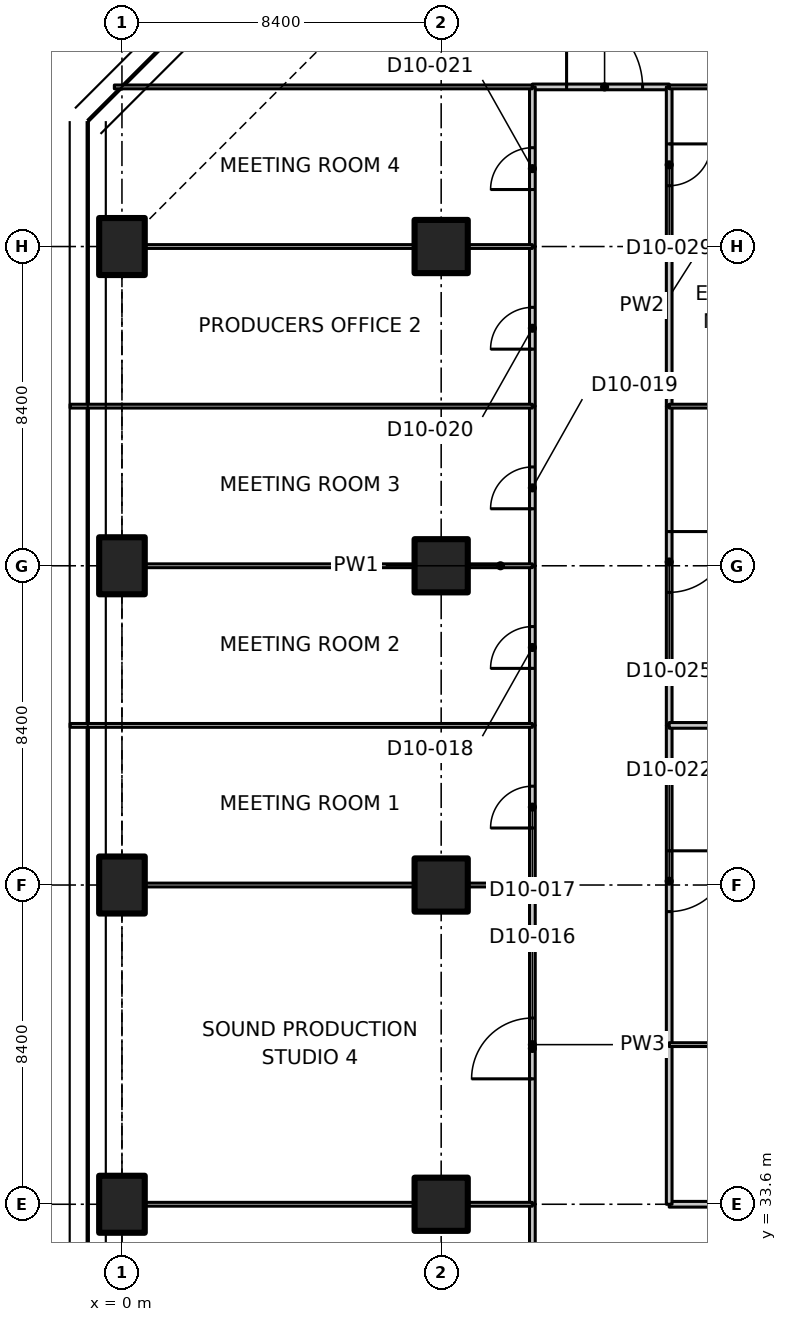
"""IFC4 building model, lengths in metres.
Left out: names, types, materials, properties, quantities, classifications, styles, units other than length and angle.
Written with IfcOpenShell. Run it as: python <this file> out.ifc"""

import sys

from ifc_helpers import new_model, si_unit, direction, frame, frame_2d, origin, origin_2d, place, context, subcontext, project, spatial, polyline, rectangle, outline, extrude, element, fill, save


model = new_model("IFC4")
c1 = context("Model", 3, precision=1e-05, world=origin(), true_north=direction((0.0, 1.0)))
c2 = subcontext(c1, "Body", "Model", "MODEL_VIEW")
j1 = project(units=[si_unit("LENGTHUNIT", "METRE"), si_unit("PLANEANGLEUNIT", "RADIAN")], contexts=[c1])
p1 = place(None, origin())
s1 = spatial("IfcSite", under=j1, at=p1, CompositionType="ELEMENT")
p2 = place(p1, origin())
s2 = spatial("IfcBuilding", under=s1, at=p2, CompositionType="ELEMENT")
p3 = place(p2, frame((0.0, 0.0, 68.9)))
s3 = spatial("IfcBuildingStorey", under=s2, at=p3, CompositionType="ELEMENT", Elevation=68.9)
for number, where, z_axis, x_axis in (
    (1, (0.0, 33.6, 0.0), (0.0, 0.0, 1.0), (1.0, 0.0, 0.0)),
    (2, (0.0, 42.0, 0.0), (0.0, 0.0, 1.0), (1.0, 0.0, 0.0)),
    (3, (0.0, 50.4, 0.0), (0.0, 0.0, 1.0), (1.0, 0.0, 0.0)),
    (4, (0.0, 58.8, 0.0), (0.0, 0.0, 1.0), (1.0, 0.0, 0.0)),
):
    element("IfcColumn", number, at=place(p3, frame(where, z_axis=z_axis, x_axis=x_axis)), inside=s3, PredefinedType="COLUMN", context=c2, shape_type="SweptSolid", body=[
        extrude(rectangle(XDim=1.2, YDim=1.5, at=origin_2d()), origin(), (0.0, 0.0, 1.0), 3.35),
    ])
for number, where, z_axis, x_axis in (
    (5, (8.4, 33.6, 0.0), (0.0, 0.0, 1.0), (1.0, 0.0, 0.0)),
    (6, (8.4, 42.0, 0.0), (0.0, 0.0, 1.0), (1.0, 0.0, 0.0)),
    (7, (8.4, 50.4, 0.0), (0.0, 0.0, 1.0), (1.0, 0.0, 0.0)),
    (8, (8.4, 58.8, 0.0), (0.0, 0.0, 1.0), (1.0, 0.0, 0.0)),
):
    element("IfcColumn", number, at=place(p3, frame(where, z_axis=z_axis, x_axis=x_axis)), inside=s3, PredefinedType="COLUMN", context=c2, shape_type="SweptSolid", body=[
        extrude(rectangle(XDim=1.4, YDim=1.4, at=origin_2d()), origin(), (0.0, 0.0, 1.0), 3.35),
    ])
p4 = place(p3, frame((10.8, 25.2, 0.0), z_axis=(0.0, 0.0, 1.0), x_axis=(0.0, 1.0, 0.0)))
e9 = element("IfcWall", 9, at=p4, inside=s3, PredefinedType="PARTITIONING", context=c2, shape_type="SweptSolid", body=[
    extrude(rectangle(XDim=8.4, YDim=0.15, at=frame_2d((4.2, 0.0))), origin(), (0.0, 0.0, 1.0), 3.33),
])
p5 = place(p4, frame((3.3, 0.0, 0.0)))
e10 = element("IfcOpeningElement", 10, at=p5, cuts=e9, PredefinedType="OPENING", context=c2, shape_type="SweptSolid", body=[
    extrude(rectangle(XDim=1.6, YDim=2.1, at=frame_2d((0.8, 1.05))), frame((0.0, 0.085, 0.0), z_axis=(0.0, -1.0, 0.0), x_axis=(1.0, 0.0, 0.0)), (0.0, 0.0, 1.0), 0.17),
])
p6 = place(p3, frame((14.4, 33.6, 0.0), z_axis=(0.0, 0.0, 1.0), x_axis=(1.0, 0.0, 0.0)))
e11 = element("IfcWall", 11, at=p6, inside=s3, PredefinedType="PARTITIONING", context=c2, shape_type="SweptSolid", body=[
    extrude(rectangle(XDim=1.5, YDim=0.15, at=frame_2d((0.75, 0.0))), origin(), (0.0, 0.0, 1.0), 3.33),
])
p7 = place(p3, frame((10.8, 63.0, 0.0), z_axis=(0.0, 0.0, 1.0), x_axis=(1.0, 0.0, 0.0)))
e12 = element("IfcWall", 12, at=p7, inside=s3, PredefinedType="PARTITIONING", context=c2, shape_type="SweptSolid", body=[
    extrude(rectangle(XDim=3.6, YDim=0.15, at=frame_2d((1.8, 0.0))), origin(), (0.0, 0.0, 1.0), 3.33),
])
p8 = place(p7, frame((0.9, 0.0, 0.0)))
e13 = element("IfcOpeningElement", 13, at=p8, cuts=e12, PredefinedType="OPENING", context=c2, shape_type="SweptSolid", body=[
    extrude(rectangle(XDim=2.0, YDim=2.4, at=frame_2d((1.0, 1.2))), frame((0.0, 0.085, 0.0), z_axis=(0.0, -1.0, 0.0), x_axis=(1.0, 0.0, 0.0)), (0.0, 0.0, 1.0), 0.17),
])
p9 = place(p3, frame((10.8, 33.6, 0.0), z_axis=(0.0, 0.0, 1.0), x_axis=(0.0, 1.0, 0.0)))
e14 = element("IfcWall", 14, at=p9, inside=s3, PredefinedType="PARTITIONING", context=c2, shape_type="SweptSolid", body=[
    extrude(rectangle(XDim=8.4, YDim=0.15, at=frame_2d((4.2, 0.0))), origin(), (0.0, 0.0, 1.0), 3.33),
])
p10 = place(p9, frame((3.3, 0.0, 0.0)))
e15 = element("IfcOpeningElement", 15, at=p10, cuts=e14, PredefinedType="OPENING", context=c2, shape_type="SweptSolid", body=[
    extrude(rectangle(XDim=1.6, YDim=2.1, at=frame_2d((0.8, 1.05))), frame((0.0, 0.085, 0.0), z_axis=(0.0, -1.0, 0.0), x_axis=(1.0, 0.0, 0.0)), (0.0, 0.0, 1.0), 0.17),
])
p11 = place(p3, frame((10.8, 42.0, 0.0), z_axis=(0.0, 0.0, 1.0), x_axis=(0.0, 1.0, 0.0)))
e16 = element("IfcWall", 16, at=p11, inside=s3, PredefinedType="PARTITIONING", context=c2, shape_type="SweptSolid", body=[
    extrude(rectangle(XDim=4.2, YDim=0.15, at=frame_2d((2.1, 0.0))), origin(), (0.0, 0.0, 1.0), 3.33),
])
p12 = place(p11, frame((1.5, 0.0, 0.0)))
e17 = element("IfcOpeningElement", 17, at=p12, cuts=e16, PredefinedType="OPENING", context=c2, shape_type="SweptSolid", body=[
    extrude(rectangle(XDim=1.1, YDim=2.1, at=frame_2d((0.55, 1.05))), frame((0.0, 0.085, 0.0), z_axis=(0.0, -1.0, 0.0), x_axis=(1.0, 0.0, 0.0)), (0.0, 0.0, 1.0), 0.17),
])
p13 = place(p3, frame((10.8, 46.2, 0.0), z_axis=(0.0, 0.0, 1.0), x_axis=(0.0, 1.0, 0.0)))
e18 = element("IfcWall", 18, at=p13, inside=s3, PredefinedType="PARTITIONING", context=c2, shape_type="SweptSolid", body=[
    extrude(rectangle(XDim=4.2, YDim=0.15, at=frame_2d((2.1, 0.0))), origin(), (0.0, 0.0, 1.0), 3.33),
])
p14 = place(p13, frame((1.5, 0.0, 0.0)))
e19 = element("IfcOpeningElement", 19, at=p14, cuts=e18, PredefinedType="OPENING", context=c2, shape_type="SweptSolid", body=[
    extrude(rectangle(XDim=1.1, YDim=2.1, at=frame_2d((0.55, 1.05))), frame((0.0, 0.085, 0.0), z_axis=(0.0, -1.0, 0.0), x_axis=(1.0, 0.0, 0.0)), (0.0, 0.0, 1.0), 0.17),
])
p15 = place(p3, frame((10.8, 50.4, 0.0), z_axis=(0.0, 0.0, 1.0), x_axis=(0.0, 1.0, 0.0)))
e20 = element("IfcWall", 20, at=p15, inside=s3, PredefinedType="PARTITIONING", context=c2, shape_type="SweptSolid", body=[
    extrude(rectangle(XDim=4.2, YDim=0.15, at=frame_2d((2.1, 0.0))), origin(), (0.0, 0.0, 1.0), 3.33),
])
p16 = place(p15, frame((1.5, 0.0, 0.0)))
e21 = element("IfcOpeningElement", 21, at=p16, cuts=e20, PredefinedType="OPENING", context=c2, shape_type="SweptSolid", body=[
    extrude(rectangle(XDim=1.1, YDim=2.1, at=frame_2d((0.55, 1.05))), frame((0.0, 0.085, 0.0), z_axis=(0.0, -1.0, 0.0), x_axis=(1.0, 0.0, 0.0)), (0.0, 0.0, 1.0), 0.17),
])
p17 = place(p3, frame((10.8, 54.6, 0.0), z_axis=(0.0, 0.0, 1.0), x_axis=(0.0, 1.0, 0.0)))
e22 = element("IfcWall", 22, at=p17, inside=s3, PredefinedType="PARTITIONING", context=c2, shape_type="SweptSolid", body=[
    extrude(rectangle(XDim=4.2, YDim=0.15, at=frame_2d((2.1, 0.0))), origin(), (0.0, 0.0, 1.0), 3.33),
])
p18 = place(p17, frame((1.5, 0.0, 0.0)))
e23 = element("IfcOpeningElement", 23, at=p18, cuts=e22, PredefinedType="OPENING", context=c2, shape_type="SweptSolid", body=[
    extrude(rectangle(XDim=1.1, YDim=2.1, at=frame_2d((0.55, 1.05))), frame((0.0, 0.085, 0.0), z_axis=(0.0, -1.0, 0.0), x_axis=(1.0, 0.0, 0.0)), (0.0, 0.0, 1.0), 0.17),
])
p19 = place(p3, frame((10.8, 58.8, 0.0), z_axis=(0.0, 0.0, 1.0), x_axis=(0.0, 1.0, 0.0)))
e24 = element("IfcWall", 24, at=p19, inside=s3, PredefinedType="PARTITIONING", context=c2, shape_type="SweptSolid", body=[
    extrude(rectangle(XDim=4.2, YDim=0.15, at=frame_2d((2.1, 0.0))), origin(), (0.0, 0.0, 1.0), 3.33),
])
p20 = place(p19, frame((1.5, 0.0, 0.0)))
e25 = element("IfcOpeningElement", 25, at=p20, cuts=e24, PredefinedType="OPENING", context=c2, shape_type="SweptSolid", body=[
    extrude(rectangle(XDim=1.1, YDim=2.1, at=frame_2d((0.55, 1.05))), frame((0.0, 0.085, 0.0), z_axis=(0.0, -1.0, 0.0), x_axis=(1.0, 0.0, 0.0)), (0.0, 0.0, 1.0), 0.17),
])
p21 = place(p3, frame((14.4, 46.2, 0.0), z_axis=(0.0, 0.0, 1.0), x_axis=(0.0, -1.0, 0.0)))
e26 = element("IfcWall", 26, at=p21, inside=s3, PredefinedType="PARTITIONING", context=c2, shape_type="SweptSolid", body=[
    extrude(rectangle(XDim=8.4, YDim=0.15, at=frame_2d((4.2, 0.0))), origin(), (0.0, 0.0, 1.0), 3.33),
])
p22 = place(p21, frame((3.3, 0.0, 0.0)))
e27 = element("IfcOpeningElement", 27, at=p22, cuts=e26, PredefinedType="OPENING", context=c2, shape_type="SweptSolid", body=[
    extrude(rectangle(XDim=1.6, YDim=2.1, at=frame_2d((0.8, 1.05))), frame((0.0, 0.085, 0.0), z_axis=(0.0, -1.0, 0.0), x_axis=(1.0, 0.0, 0.0)), (0.0, 0.0, 1.0), 0.17),
])
p23 = place(p3, frame((14.4, 37.8, 0.0), z_axis=(0.0, 0.0, 1.0), x_axis=(0.0, -1.0, 0.0)))
e28 = element("IfcWall", 28, at=p23, inside=s3, PredefinedType="PARTITIONING", context=c2, shape_type="SweptSolid", body=[
    extrude(rectangle(XDim=4.2, YDim=0.15, at=frame_2d((2.1, 0.0))), origin(), (0.0, 0.0, 1.0), 3.33),
])
p24 = place(p3, frame((14.4, 54.6, 0.0), z_axis=(0.0, 0.0, 1.0), x_axis=(0.0, -1.0, 0.0)))
e29 = element("IfcWall", 29, at=p24, inside=s3, PredefinedType="PARTITIONING", context=c2, shape_type="SweptSolid", body=[
    extrude(rectangle(XDim=8.4, YDim=0.15, at=frame_2d((4.2, 0.0))), origin(), (0.0, 0.0, 1.0), 3.33),
])
p25 = place(p24, frame((3.3, 0.0, 0.0)))
e30 = element("IfcOpeningElement", 30, at=p25, cuts=e29, PredefinedType="OPENING", context=c2, shape_type="SweptSolid", body=[
    extrude(rectangle(XDim=1.6, YDim=2.1, at=frame_2d((0.8, 1.05))), frame((0.0, 0.085, 0.0), z_axis=(0.0, -1.0, 0.0), x_axis=(1.0, 0.0, 0.0)), (0.0, 0.0, 1.0), 0.17),
])
p26 = place(p3, frame((14.4, 58.8, 0.0), z_axis=(0.0, 0.0, 1.0), x_axis=(0.0, -1.0, 0.0)))
e31 = element("IfcWall", 31, at=p26, inside=s3, PredefinedType="PARTITIONING", context=c2, shape_type="SweptSolid", body=[
    extrude(rectangle(XDim=4.2, YDim=0.15, at=frame_2d((2.1, 0.0))), origin(), (0.0, 0.0, 1.0), 3.33),
])
p27 = place(p3, frame((14.4, 63.0, 0.0), z_axis=(0.0, 0.0, 1.0), x_axis=(0.0, -1.0, 0.0)))
e32 = element("IfcWall", 32, at=p27, inside=s3, PredefinedType="PARTITIONING", context=c2, shape_type="SweptSolid", body=[
    extrude(rectangle(XDim=4.2, YDim=0.15, at=frame_2d((2.1, 0.0))), origin(), (0.0, 0.0, 1.0), 3.33),
])
p28 = place(p27, frame((1.5, 0.0, 0.0)))
e33 = element("IfcOpeningElement", 33, at=p28, cuts=e32, PredefinedType="OPENING", context=c2, shape_type="SweptSolid", body=[
    extrude(rectangle(XDim=1.1, YDim=2.1, at=frame_2d((0.55, 1.05))), frame((0.0, 0.085, 0.0), z_axis=(0.0, -1.0, 0.0), x_axis=(1.0, 0.0, 0.0)), (0.0, 0.0, 1.0), 0.17),
])
p29 = place(p3, frame((10.8, 63.0, 0.0), z_axis=(0.0, 0.0, 1.0), x_axis=(-1.0, 0.0, 0.0)))
e34 = element("IfcWall", 34, at=p29, inside=s3, PredefinedType="PARTITIONING", context=c2, shape_type="SweptSolid", body=[
    extrude(outline(polyline([(0.0, 0.0), (11.0, 0.0), (11.0, 3.33), (7.266, 3.33), (7.264, 2.98), (5.936, 2.98), (5.934, 3.33), (0.0, 3.33), (0.0, 0.0)])), frame((0.0, 0.05, 0.0), z_axis=(0.0, -1.0, 0.0), x_axis=(1.0, 0.0, 0.0)), (0.0, 0.0, 1.0), 0.1),
])
p30 = place(p3, frame((25.4, 63.0, 0.0), z_axis=(0.0, 0.0, 1.0), x_axis=(-1.0, 0.0, 0.0)))
e35 = element("IfcWall", 35, at=p30, inside=s3, PredefinedType="PARTITIONING", context=c2, shape_type="SweptSolid", body=[
    extrude(outline(polyline([(0.0, 0.0), (11.0, 0.0), (11.0, 3.33), (5.066, 3.33), (5.064, 2.98), (3.736, 2.98), (3.734, 3.33), (0.0, 3.33), (0.0, 0.0)])), frame((0.0, 0.05, 0.0), z_axis=(0.0, -1.0, 0.0), x_axis=(1.0, 0.0, 0.0)), (0.0, 0.0, 1.0), 0.1),
])
p31 = place(p3, frame((0.62, 33.6, 0.0), z_axis=(0.0, 0.0, 1.0), x_axis=(1.0, 0.0, 0.0)))
e36 = element("IfcWall", 36, at=p31, inside=s3, PredefinedType="PARTITIONING", context=c2, shape_type="SweptSolid", body=[
    extrude(rectangle(XDim=7.06, YDim=0.1, at=frame_2d((3.53, 0.0))), origin(), (0.0, 0.0, 1.0), 3.33),
])
p32 = place(p3, frame((9.12, 33.6, 0.0), z_axis=(0.0, 0.0, 1.0), x_axis=(1.0, 0.0, 0.0)))
e37 = element("IfcWall", 37, at=p32, inside=s3, PredefinedType="PARTITIONING", context=c2, shape_type="SweptSolid", body=[
    extrude(rectangle(XDim=1.68, YDim=0.1, at=frame_2d((0.84, 0.0))), origin(), (0.0, 0.0, 1.0), 3.33),
])
p33 = place(p3, frame((0.62, 42.0, 0.0), z_axis=(0.0, 0.0, 1.0), x_axis=(1.0, 0.0, 0.0)))
e38 = element("IfcWall", 38, at=p33, inside=s3, PredefinedType="PARTITIONING", context=c2, shape_type="SweptSolid", body=[
    extrude(rectangle(XDim=7.06, YDim=0.1, at=frame_2d((3.53, 0.0))), origin(), (0.0, 0.0, 1.0), 3.33),
])
p34 = place(p3, frame((9.12, 42.0, 0.0), z_axis=(0.0, 0.0, 1.0), x_axis=(1.0, 0.0, 0.0)))
e39 = element("IfcWall", 39, at=p34, inside=s3, PredefinedType="PARTITIONING", context=c2, shape_type="SweptSolid", body=[
    extrude(rectangle(XDim=1.68, YDim=0.1, at=frame_2d((0.84, 0.0))), origin(), (0.0, 0.0, 1.0), 3.33),
])
p35 = place(p3, frame((-1.365, 46.2, 0.0), z_axis=(0.0, 0.0, 1.0), x_axis=(1.0, 0.0, 0.0)))
e40 = element("IfcWall", 40, at=p35, inside=s3, PredefinedType="PARTITIONING", context=c2, shape_type="SweptSolid", body=[
    extrude(outline(polyline([(0.0, 0.0), (12.165, 0.0), (12.165, 3.33), (1.815, 3.33), (1.813, 2.98), (0.917, 2.98), (0.915, 3.33), (0.265, 3.33), (0.0, 3.33), (0.0, 0.0)])), frame((0.0, 0.05, 0.0), z_axis=(0.0, -1.0, 0.0), x_axis=(1.0, 0.0, 0.0)), (0.0, 0.0, 1.0), 0.1),
])
p36 = place(p3, frame((0.62, 50.4, 0.0), z_axis=(0.0, 0.0, 1.0), x_axis=(1.0, 0.0, 0.0)))
e41 = element("IfcWall", 41, at=p36, inside=s3, PredefinedType="PARTITIONING", context=c2, shape_type="SweptSolid", body=[
    extrude(rectangle(XDim=7.06, YDim=0.1, at=frame_2d((3.53, 0.0))), origin(), (0.0, 0.0, 1.0), 3.33),
])
p37 = place(p3, frame((9.12, 50.4, 0.0), z_axis=(0.0, 0.0, 1.0), x_axis=(1.0, 0.0, 0.0)))
e42 = element("IfcWall", 42, at=p37, inside=s3, PredefinedType="PARTITIONING", context=c2, shape_type="SweptSolid", body=[
    extrude(rectangle(XDim=1.68, YDim=0.1, at=frame_2d((0.84, 0.0))), origin(), (0.0, 0.0, 1.0), 3.33),
])
p38 = place(p3, frame((-1.365, 54.6, 0.0), z_axis=(0.0, 0.0, 1.0), x_axis=(1.0, 0.0, 0.0)))
e43 = element("IfcWall", 43, at=p38, inside=s3, PredefinedType="PARTITIONING", context=c2, shape_type="SweptSolid", body=[
    extrude(outline(polyline([(0.0, 0.0), (12.165, 0.0), (12.165, 3.33), (1.815, 3.33), (1.813, 2.98), (0.917, 2.98), (0.915, 3.33), (0.265, 3.33), (0.0, 3.33), (0.0, 0.0)])), frame((0.0, 0.05, 0.0), z_axis=(0.0, -1.0, 0.0), x_axis=(1.0, 0.0, 0.0)), (0.0, 0.0, 1.0), 0.1),
])
p39 = place(p3, frame((0.62, 58.8, 0.0), z_axis=(0.0, 0.0, 1.0), x_axis=(1.0, 0.0, 0.0)))
e44 = element("IfcWall", 44, at=p39, inside=s3, PredefinedType="PARTITIONING", context=c2, shape_type="SweptSolid", body=[
    extrude(rectangle(XDim=7.06, YDim=0.1, at=frame_2d((3.53, 0.0))), origin(), (0.0, 0.0, 1.0), 3.33),
])
p40 = place(p3, frame((9.12, 58.8, 0.0), z_axis=(0.0, 0.0, 1.0), x_axis=(1.0, 0.0, 0.0)))
e45 = element("IfcWall", 45, at=p40, inside=s3, PredefinedType="PARTITIONING", context=c2, shape_type="SweptSolid", body=[
    extrude(rectangle(XDim=1.68, YDim=0.1, at=frame_2d((0.84, 0.0))), origin(), (0.0, 0.0, 1.0), 3.33),
])
p41 = place(p3, frame((24.0, 37.8, 0.0), z_axis=(0.0, 0.0, 1.0), x_axis=(-1.0, 0.0, 0.0)))
e46 = element("IfcWall", 46, at=p41, inside=s3, PredefinedType="PARTITIONING", context=c2, shape_type="SweptSolid", body=[
    extrude(rectangle(XDim=9.6, YDim=0.1, at=frame_2d((4.8, 0.0))), origin(), (0.0, 0.0, 1.0), 3.33),
])
p42 = place(p41, frame((4.2, 0.0, 0.0)))
e47 = element("IfcOpeningElement", 47, at=p42, cuts=e46, PredefinedType="OPENING", context=c2, shape_type="SweptSolid", body=[
    extrude(rectangle(XDim=1.2, YDim=2.1, at=frame_2d((0.6, 1.05))), frame((0.0, 0.06, 0.0), z_axis=(0.0, -1.0, 0.0), x_axis=(1.0, 0.0, 0.0)), (0.0, 0.0, 1.0), 0.12),
])
p43 = place(p3, frame((14.4, 46.2, 0.0), z_axis=(0.0, 0.0, 1.0), x_axis=(1.0, 0.0, 0.0)))
e48 = element("IfcWall", 48, at=p43, inside=s3, PredefinedType="PARTITIONING", context=c2, shape_type="SweptSolid", body=[
    extrude(outline(polyline([(0.0, 0.0), (12.165, 0.0), (12.165, 3.33), (11.9, 3.33), (11.25, 3.33), (11.248, 2.98), (10.352, 2.98), (10.35, 3.33), (0.0, 3.33), (0.0, 0.0)])), frame((0.0, 0.075, 0.0), z_axis=(0.0, -1.0, 0.0), x_axis=(1.0, 0.0, 0.0)), (0.0, 0.0, 1.0), 0.15),
])
p44 = place(p3, frame((14.4, 54.6, 0.0), z_axis=(0.0, 0.0, 1.0), x_axis=(1.0, 0.0, 0.0)))
e49 = element("IfcWall", 49, at=p44, inside=s3, PredefinedType="PARTITIONING", context=c2, shape_type="SweptSolid", body=[
    extrude(rectangle(XDim=4.2, YDim=0.1, at=frame_2d((2.1, 0.0))), origin(), (0.0, 0.0, 1.0), 3.33),
])
p45 = place(p44, frame((1.8, 0.0, 0.0)))
e50 = element("IfcOpeningElement", 50, at=p45, cuts=e49, PredefinedType="OPENING", context=c2, shape_type="SweptSolid", body=[
    extrude(rectangle(XDim=0.9, YDim=2.1, at=frame_2d((0.45, 1.05))), frame((0.0, 0.06, 0.0), z_axis=(0.0, -1.0, 0.0), x_axis=(1.0, 0.0, 0.0)), (0.0, 0.0, 1.0), 0.12),
])
p46 = place(p3, frame((14.4, 58.8, 0.0), z_axis=(0.0, 0.0, 1.0), x_axis=(1.0, 0.0, 0.0)))
e51 = element("IfcWall", 51, at=p46, inside=s3, PredefinedType="PARTITIONING", context=c2, shape_type="SweptSolid", body=[
    extrude(rectangle(XDim=1.68, YDim=0.125, at=frame_2d((0.84, 0.0))), origin(), (0.0, 0.0, 1.0), 3.33),
])
p47 = place(p8, origin())
e52 = element("IfcDoor", 52, at=p47, inside=s3, OperationType="DOUBLE_DOOR_SINGLE_SWING", PredefinedType="DOOR", context=c2, shape_type="SweptSolid", body=[
    extrude(rectangle(XDim=2.0, YDim=2.4, at=frame_2d((1.0, 1.2))), frame((0.0, 0.025, 0.0), z_axis=(0.0, -1.0, 0.0), x_axis=(1.0, 0.0, 0.0)), (0.0, 0.0, 1.0), 0.05),
])
fill(e13, e52)
p48 = place(p10, origin())
e53 = element("IfcDoor", 53, at=p48, inside=s3, OperationType="DOUBLE_DOOR_SINGLE_SWING", PredefinedType="DOOR", context=c2, shape_type="SweptSolid", body=[
    extrude(rectangle(XDim=1.6, YDim=2.1, at=frame_2d((0.8, 1.05))), frame((0.0, 0.025, 0.0), z_axis=(0.0, -1.0, 0.0), x_axis=(1.0, 0.0, 0.0)), (0.0, 0.0, 1.0), 0.05),
])
fill(e15, e53)
p49 = place(p12, origin())
e54 = element("IfcDoor", 54, at=p49, inside=s3, OperationType="SINGLE_SWING_LEFT", PredefinedType="DOOR", context=c2, shape_type="SweptSolid", body=[
    extrude(rectangle(XDim=1.1, YDim=2.1, at=frame_2d((0.55, 1.05))), frame((0.0, 0.025, 0.0), z_axis=(0.0, -1.0, 0.0), x_axis=(1.0, 0.0, 0.0)), (0.0, 0.0, 1.0), 0.05),
])
fill(e17, e54)
p50 = place(p14, origin())
e55 = element("IfcDoor", 55, at=p50, inside=s3, OperationType="SINGLE_SWING_LEFT", PredefinedType="DOOR", context=c2, shape_type="SweptSolid", body=[
    extrude(rectangle(XDim=1.1, YDim=2.1, at=frame_2d((0.55, 1.05))), frame((0.0, 0.025, 0.0), z_axis=(0.0, -1.0, 0.0), x_axis=(1.0, 0.0, 0.0)), (0.0, 0.0, 1.0), 0.05),
])
fill(e19, e55)
p51 = place(p16, origin())
e56 = element("IfcDoor", 56, at=p51, inside=s3, OperationType="SINGLE_SWING_LEFT", PredefinedType="DOOR", context=c2, shape_type="SweptSolid", body=[
    extrude(rectangle(XDim=1.1, YDim=2.1, at=frame_2d((0.55, 1.05))), frame((0.0, 0.025, 0.0), z_axis=(0.0, -1.0, 0.0), x_axis=(1.0, 0.0, 0.0)), (0.0, 0.0, 1.0), 0.05),
])
fill(e21, e56)
p52 = place(p18, origin())
e57 = element("IfcDoor", 57, at=p52, inside=s3, OperationType="SINGLE_SWING_LEFT", PredefinedType="DOOR", context=c2, shape_type="SweptSolid", body=[
    extrude(rectangle(XDim=1.1, YDim=2.1, at=frame_2d((0.55, 1.05))), frame((0.0, 0.025, 0.0), z_axis=(0.0, -1.0, 0.0), x_axis=(1.0, 0.0, 0.0)), (0.0, 0.0, 1.0), 0.05),
])
fill(e23, e57)
p53 = place(p20, origin())
e58 = element("IfcDoor", 58, at=p53, inside=s3, OperationType="SINGLE_SWING_LEFT", PredefinedType="DOOR", context=c2, shape_type="SweptSolid", body=[
    extrude(rectangle(XDim=1.1, YDim=2.1, at=frame_2d((0.55, 1.05))), frame((0.0, 0.025, 0.0), z_axis=(0.0, -1.0, 0.0), x_axis=(1.0, 0.0, 0.0)), (0.0, 0.0, 1.0), 0.05),
])
fill(e25, e58)
p54 = place(p22, origin())
e59 = element("IfcDoor", 59, at=p54, inside=s3, OperationType="DOUBLE_DOOR_SINGLE_SWING", PredefinedType="DOOR", context=c2, shape_type="SweptSolid", body=[
    extrude(rectangle(XDim=1.6, YDim=2.1, at=frame_2d((0.8, 1.05))), frame((0.0, 0.025, 0.0), z_axis=(0.0, -1.0, 0.0), x_axis=(1.0, 0.0, 0.0)), (0.0, 0.0, 1.0), 0.05),
])
fill(e27, e59)
p55 = place(p25, origin())
e60 = element("IfcDoor", 60, at=p55, inside=s3, OperationType="DOUBLE_DOOR_SINGLE_SWING", PredefinedType="DOOR", context=c2, shape_type="SweptSolid", body=[
    extrude(rectangle(XDim=1.6, YDim=2.1, at=frame_2d((0.8, 1.05))), frame((0.0, 0.025, 0.0), z_axis=(0.0, -1.0, 0.0), x_axis=(1.0, 0.0, 0.0)), (0.0, 0.0, 1.0), 0.05),
])
fill(e30, e60)
p56 = place(p28, origin())
e61 = element("IfcDoor", 61, at=p56, inside=s3, OperationType="SINGLE_SWING_LEFT", PredefinedType="DOOR", context=c2, shape_type="SweptSolid", body=[
    extrude(rectangle(XDim=1.1, YDim=2.1, at=frame_2d((0.55, 1.05))), frame((0.0, 0.025, 0.0), z_axis=(0.0, -1.0, 0.0), x_axis=(1.0, 0.0, 0.0)), (0.0, 0.0, 1.0), 0.05),
])
fill(e33, e61)
save(model, sys.argv[1])
